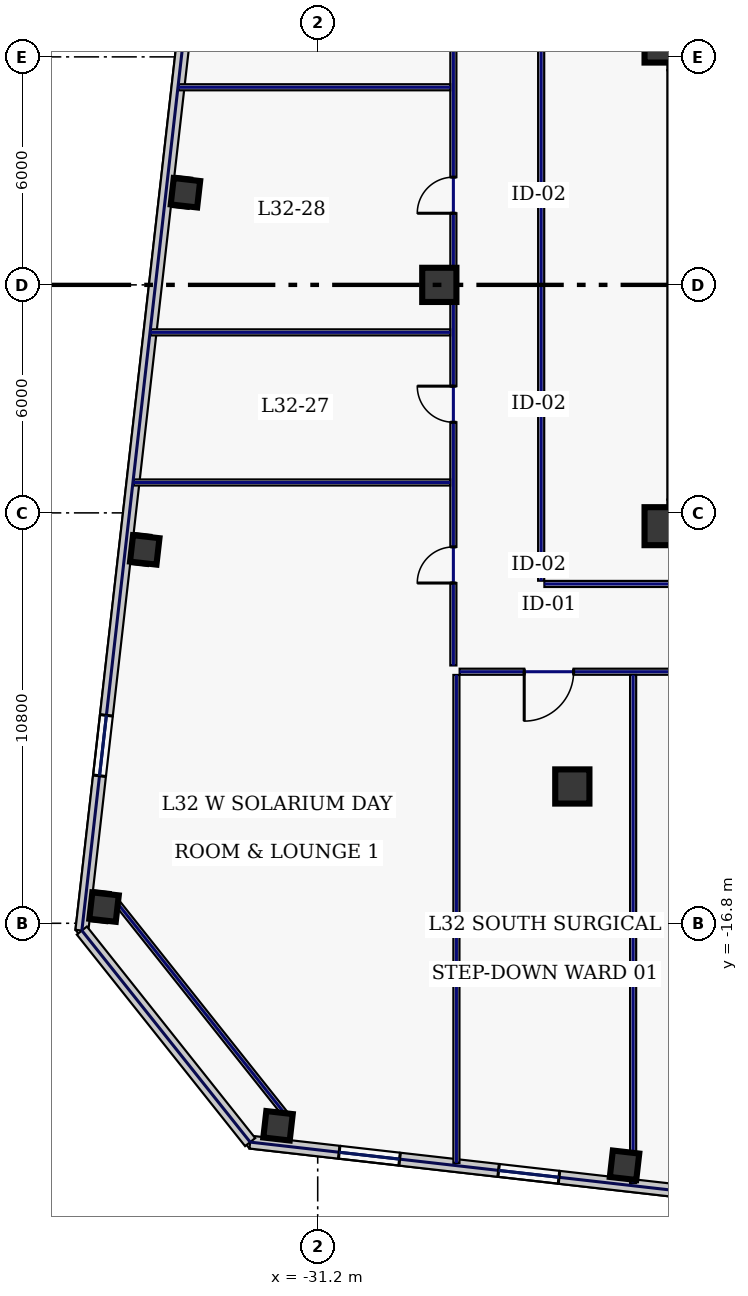
"""IFC4 building model, lengths in metres.
Left out: names, types, materials, properties, quantities, classifications, styles, units other than length and angle.
Written with IfcOpenShell. Run it as: python <this file> out.ifc"""

import sys

from ifc_helpers import new_model, si_unit, direction, frame, frame_2d, origin, origin_2d, place, context, subcontext, project, spatial, rectangle, hollow_rectangle, extrude, element, fill, save


model = new_model("IFC4")
c1 = context("Model", 3, precision=1e-05, world=origin(), true_north=direction((0.0, 1.0)))
c2 = subcontext(c1, "Body", "Model", "MODEL_VIEW")
j1 = project(units=[si_unit("LENGTHUNIT", "METRE"), si_unit("PLANEANGLEUNIT", "RADIAN")], contexts=[c1])
p1 = place(None, origin())
s1 = spatial("IfcSite", under=j1, at=p1, CompositionType="ELEMENT")
p2 = place(p1, origin())
s2 = spatial("IfcBuilding", under=s1, at=p2, CompositionType="ELEMENT")
p3 = place(p2, frame((0.0, 0.0, 141.4)))
s3 = spatial("IfcBuildingStorey", under=s2, at=p3, CompositionType="ELEMENT", Elevation=141.4)
for number, where, z_axis, x_axis in (
    (1, (-22.0, 6.0, 0.0), (0.0, 0.0, 1.0), (1.0, 0.0, 0.0)),
    (2, (-22.0, -6.0, 0.0), (0.0, 0.0, 1.0), (1.0, 0.0, 0.0)),
):
    element("IfcWall", number, at=place(p3, frame(where, z_axis=z_axis, x_axis=x_axis)), inside=s3, PredefinedType="SHEAR", context=c2, shape_type="SweptSolid", body=[
        extrude(rectangle(XDim=11.55, YDim=0.7, at=frame_2d((5.775, 0.0))), origin(), (0.0, 0.0, 1.0), 4.48),
    ])
p4 = place(p3, frame((-21.6, -5.65, 0.0), z_axis=(0.0, 0.0, 1.0), x_axis=(0.0, 1.0, 0.0)))
e3 = element("IfcWall", 3, at=p4, inside=s3, PredefinedType="SHEAR", context=c2, shape_type="SweptSolid", body=[
    extrude(rectangle(XDim=11.3, YDim=0.8, at=frame_2d((5.65, 0.0))), origin(), (0.0, 0.0, 1.0), 4.48),
])
for number, where, z_axis, x_axis in (
    (4, (-22.1, -6.35, 0.0), (0.0, 0.0, 1.0), (1.0, 0.0, 0.0)),
    (5, (-22.1, 6.35, 0.0), (0.0, 0.0, 1.0), (1.0, 0.0, 0.0)),
):
    element("IfcColumn", number, at=place(p3, frame(where, z_axis=z_axis, x_axis=x_axis)), inside=s3, PredefinedType="COLUMN", context=c2, shape_type="SweptSolid", body=[
        extrude(hollow_rectangle(XDim=1.0, YDim=1.0, WallThickness=0.045, at=origin_2d()), origin(), (0.0, 0.0, 1.0), 4.48),
    ])
for number, where, z_axis, x_axis in (
    (6, (-24.5, -13.2, 0.0), (0.0, 0.0, 1.0), (1.0, 0.0, 0.0)),
    (7, (-28.0, 0.0, 0.0), (0.0, 0.0, 1.0), (1.0, 0.0, 0.0)),
):
    element("IfcColumn", number, at=place(p3, frame(where, z_axis=z_axis, x_axis=x_axis)), inside=s3, PredefinedType="COLUMN", context=c2, shape_type="SweptSolid", body=[
        extrude(hollow_rectangle(XDim=0.9, YDim=0.9, WallThickness=0.04, at=origin_2d()), origin(), (0.0, 0.0, 1.0), 4.48),
    ])
for number, where, z_axis, x_axis in (
    (8, (-32.244, -22.129, 0.0), (0.0, 0.0, 1.0), (0.994, -0.113, 0.0)),
    (9, (-23.126, -23.168, 0.0), (0.0, 0.0, 1.0), (0.994, -0.113, 0.0)),
    (10, (-34.68, 2.425, 0.0), (0.0, 0.0, 1.0), (0.994, -0.113, 0.0)),
    (11, (-35.751, -6.974, 0.0), (0.0, 0.0, 1.0), (0.994, -0.113, 0.0)),
    (12, (-36.822, -16.374, 0.0), (0.0, 0.0, 1.0), (0.994, -0.113, 0.0)),
):
    element("IfcColumn", number, at=place(p3, frame(where, z_axis=z_axis, x_axis=x_axis)), inside=s3, PredefinedType="COLUMN", context=c2, shape_type="SweptSolid", body=[
        extrude(hollow_rectangle(XDim=0.7, YDim=0.7, WallThickness=0.032, at=origin_2d()), origin(), (0.0, 0.0, 1.0), 4.48),
    ])
p5 = place(p3, frame((-32.977, -22.559, 0.0), z_axis=(0.0, 0.0, 1.0), x_axis=(0.993571877006, -0.113203026563, 0.0)))
e13 = element("IfcWall", 13, at=p5, inside=s3, PredefinedType="STANDARD", context=c2, shape_type="SweptSolid", body=[
    extrude(rectangle(XDim=20.523, YDim=0.34, at=frame_2d((10.261, 0.0))), origin(), (0.0, 0.0, 1.0), 4.48),
])
p6 = place(p5, frame((2.358, 0.0, 0.22)))
e14 = element("IfcOpeningElement", 14, at=p6, cuts=e13, PredefinedType="OPENING", context=c2, shape_type="SweptSolid", body=[
    extrude(rectangle(XDim=1.6, YDim=1.2, at=frame_2d((0.8, 0.6))), frame((0.0, 0.18, 0.0), z_axis=(0.0, -1.0, 0.0), x_axis=(1.0, 0.0, 0.0)), (0.0, 0.0, 1.0), 0.36),
])
p7 = place(p5, frame((6.579, 0.0, 0.22)))
e15 = element("IfcOpeningElement", 15, at=p7, cuts=e13, PredefinedType="OPENING", context=c2, shape_type="SweptSolid", body=[
    extrude(rectangle(XDim=1.6, YDim=1.2, at=frame_2d((0.8, 0.6))), frame((0.0, 0.18, 0.0), z_axis=(0.0, -1.0, 0.0), x_axis=(1.0, 0.0, 0.0)), (0.0, 0.0, 1.0), 0.36),
])
p8 = place(p5, frame((11.535, 0.0, 0.22)))
e16 = element("IfcOpeningElement", 16, at=p8, cuts=e13, PredefinedType="OPENING", context=c2, shape_type="SweptSolid", body=[
    extrude(rectangle(XDim=1.6, YDim=1.2, at=frame_2d((0.8, 0.6))), frame((0.0, 0.18, 0.0), z_axis=(0.0, -1.0, 0.0), x_axis=(1.0, 0.0, 0.0)), (0.0, 0.0, 1.0), 0.36),
])
p9 = place(p5, frame((15.756, 0.0, 0.22)))
e17 = element("IfcOpeningElement", 17, at=p9, cuts=e13, PredefinedType="OPENING", context=c2, shape_type="SweptSolid", body=[
    extrude(rectangle(XDim=1.6, YDim=1.2, at=frame_2d((0.8, 0.6))), frame((0.0, 0.18, 0.0), z_axis=(0.0, -1.0, 0.0), x_axis=(1.0, 0.0, 0.0)), (0.0, 0.0, 1.0), 0.36),
])
p10 = place(p3, frame((-32.968, 21.957, 0.0), z_axis=(0.0, 0.0, 1.0), x_axis=(-0.113201605824, -0.993572038877, 0.0)))
e18 = element("IfcWall", 18, at=p10, inside=s3, PredefinedType="STANDARD", context=c2, shape_type="SweptSolid", body=[
    extrude(rectangle(XDim=39.2, YDim=0.34, at=frame_2d((19.6, 0.0))), origin(), (0.0, 0.0, 1.0), 4.48),
])
p11 = place(p10, frame((4.1, 0.0, 0.22)))
e19 = element("IfcOpeningElement", 19, at=p11, cuts=e18, PredefinedType="OPENING", context=c2, shape_type="SweptSolid", body=[
    extrude(rectangle(XDim=1.6, YDim=1.2, at=frame_2d((0.8, 0.6))), frame((0.0, 0.18, 0.0), z_axis=(0.0, -1.0, 0.0), x_axis=(1.0, 0.0, 0.0)), (0.0, 0.0, 1.0), 0.36),
])
p12 = place(p10, frame((13.9, 0.0, 0.22)))
e20 = element("IfcOpeningElement", 20, at=p12, cuts=e18, PredefinedType="OPENING", context=c2, shape_type="SweptSolid", body=[
    extrude(rectangle(XDim=1.6, YDim=1.2, at=frame_2d((0.8, 0.6))), frame((0.0, 0.18, 0.0), z_axis=(0.0, -1.0, 0.0), x_axis=(1.0, 0.0, 0.0)), (0.0, 0.0, 1.0), 0.36),
])
p13 = place(p10, frame((33.5, 0.0, 0.22)))
e21 = element("IfcOpeningElement", 21, at=p13, cuts=e18, PredefinedType="OPENING", context=c2, shape_type="SweptSolid", body=[
    extrude(rectangle(XDim=1.6, YDim=1.2, at=frame_2d((0.8, 0.6))), frame((0.0, 0.18, 0.0), z_axis=(0.0, -1.0, 0.0), x_axis=(1.0, 0.0, 0.0)), (0.0, 0.0, 1.0), 0.36),
])
p14 = place(p3, frame((-37.406, -16.991, 0.0), z_axis=(0.0, 0.0, 1.0), x_axis=(0.622507800567, -0.78261359446, 0.0)))
e22 = element("IfcWall", 22, at=p14, inside=s3, PredefinedType="STANDARD", context=c2, shape_type="SweptSolid", body=[
    extrude(rectangle(XDim=7.114, YDim=0.34, at=frame_2d((3.557, 0.0))), origin(), (0.0, 0.0, 1.0), 4.48),
])
p15 = place(p3, frame((-36.556, -16.162, 0.0), z_axis=(0.0, 0.0, 1.0), x_axis=(0.622522641622, -0.782601789334, 0.0)))
e23 = element("IfcWall", 23, at=p15, inside=s3, PredefinedType="PARTITIONING", context=c2, shape_type="SweptSolid", body=[
    extrude(rectangle(XDim=7.354, YDim=0.16, at=frame_2d((3.677, 0.0))), origin(), (0.0, 0.0, 1.0), 2.275),
])
p16 = place(p3, frame((-27.63, -10.015, 0.0), z_axis=(0.0, 0.0, 1.0), x_axis=(0.0, 1.0, 0.0)))
e24 = element("IfcWall", 24, at=p16, inside=s3, PredefinedType="PARTITIONING", context=c2, shape_type="SweptSolid", body=[
    extrude(rectangle(XDim=20.13, YDim=0.16, at=frame_2d((10.065, 0.0))), origin(), (0.0, 0.0, 1.0), 4.48),
])
p17 = place(p16, frame((2.169, 0.0, 0.0)))
e25 = element("IfcOpeningElement", 25, at=p17, cuts=e24, PredefinedType="OPENING", context=c2, shape_type="SweptSolid", body=[
    extrude(rectangle(XDim=0.95, YDim=2.2, at=frame_2d((0.475, 1.1))), frame((0.0, 0.09, 0.0), z_axis=(0.0, -1.0, 0.0), x_axis=(1.0, 0.0, 0.0)), (0.0, 0.0, 1.0), 0.18),
])
p18 = place(p16, frame((6.4, 0.0, 0.0)))
e26 = element("IfcOpeningElement", 26, at=p18, cuts=e24, PredefinedType="OPENING", context=c2, shape_type="SweptSolid", body=[
    extrude(rectangle(XDim=0.95, YDim=2.2, at=frame_2d((0.475, 1.1))), frame((0.0, 0.09, 0.0), z_axis=(0.0, -1.0, 0.0), x_axis=(1.0, 0.0, 0.0)), (0.0, 0.0, 1.0), 0.18),
])
p19 = place(p16, frame((11.9, 0.0, 0.0)))
e27 = element("IfcOpeningElement", 27, at=p19, cuts=e24, PredefinedType="OPENING", context=c2, shape_type="SweptSolid", body=[
    extrude(rectangle(XDim=0.95, YDim=2.2, at=frame_2d((0.475, 1.1))), frame((0.0, 0.09, 0.0), z_axis=(0.0, -1.0, 0.0), x_axis=(1.0, 0.0, 0.0)), (0.0, 0.0, 1.0), 0.18),
])
p20 = place(p16, frame((17.131, 0.0, 0.0)))
e28 = element("IfcOpeningElement", 28, at=p20, cuts=e24, PredefinedType="OPENING", context=c2, shape_type="SweptSolid", body=[
    extrude(rectangle(XDim=0.95, YDim=2.2, at=frame_2d((0.475, 1.1))), frame((0.0, 0.09, 0.0), z_axis=(0.0, -1.0, 0.0), x_axis=(1.0, 0.0, 0.0)), (0.0, 0.0, 1.0), 0.18),
])
p21 = place(p3, frame((27.465, -10.18, 0.0), z_axis=(0.0, 0.0, 1.0), x_axis=(-1.0, 0.0, 0.0)))
e29 = element("IfcWall", 29, at=p21, inside=s3, PredefinedType="PARTITIONING", context=c2, shape_type="SweptSolid", body=[
    extrude(rectangle(XDim=54.93, YDim=0.16, at=frame_2d((27.465, 0.0))), origin(), (0.0, 0.0, 1.0), 4.48),
])
p22 = place(p21, frame((51.931, 0.0, 0.0)))
e30 = element("IfcOpeningElement", 30, at=p22, cuts=e29, PredefinedType="OPENING", context=c2, shape_type="SweptSolid", body=[
    extrude(rectangle(XDim=1.3, YDim=2.2, at=frame_2d((0.65, 1.1))), frame((0.0, 0.09, 0.0), z_axis=(0.0, -1.0, 0.0), x_axis=(1.0, 0.0, 0.0)), (0.0, 0.0, 1.0), 0.18),
])
p23 = place(p21, frame((45.225, 0.0, 0.0)))
e31 = element("IfcOpeningElement", 31, at=p23, cuts=e29, PredefinedType="OPENING", context=c2, shape_type="SweptSolid", body=[
    extrude(rectangle(XDim=0.95, YDim=2.2, at=frame_2d((0.475, 1.1))), frame((0.0, 0.09, 0.0), z_axis=(0.0, -1.0, 0.0), x_axis=(1.0, 0.0, 0.0)), (0.0, 0.0, 1.0), 0.18),
])
p24 = place(p21, frame((36.525, 0.0, 0.0)))
e32 = element("IfcOpeningElement", 32, at=p24, cuts=e29, PredefinedType="OPENING", context=c2, shape_type="SweptSolid", body=[
    extrude(rectangle(XDim=0.95, YDim=2.2, at=frame_2d((0.475, 1.1))), frame((0.0, 0.09, 0.0), z_axis=(0.0, -1.0, 0.0), x_axis=(1.0, 0.0, 0.0)), (0.0, 0.0, 1.0), 0.18),
])
p25 = place(p21, frame((28.125, 0.0, 0.0)))
e33 = element("IfcOpeningElement", 33, at=p25, cuts=e29, PredefinedType="OPENING", context=c2, shape_type="SweptSolid", body=[
    extrude(rectangle(XDim=0.95, YDim=2.2, at=frame_2d((0.475, 1.1))), frame((0.0, 0.09, 0.0), z_axis=(0.0, -1.0, 0.0), x_axis=(1.0, 0.0, 0.0)), (0.0, 0.0, 1.0), 0.18),
])
p26 = place(p21, frame((19.325, 0.0, 0.0)))
e34 = element("IfcOpeningElement", 34, at=p26, cuts=e29, PredefinedType="OPENING", context=c2, shape_type="SweptSolid", body=[
    extrude(rectangle(XDim=0.95, YDim=2.2, at=frame_2d((0.475, 1.1))), frame((0.0, 0.09, 0.0), z_axis=(0.0, -1.0, 0.0), x_axis=(1.0, 0.0, 0.0)), (0.0, 0.0, 1.0), 0.18),
])
p27 = place(p21, frame((10.75, 0.0, 0.0)))
e35 = element("IfcOpeningElement", 35, at=p27, cuts=e29, PredefinedType="OPENING", context=c2, shape_type="SweptSolid", body=[
    extrude(rectangle(XDim=1.3, YDim=2.2, at=frame_2d((0.65, 1.1))), frame((0.0, 0.09, 0.0), z_axis=(0.0, -1.0, 0.0), x_axis=(1.0, 0.0, 0.0)), (0.0, 0.0, 1.0), 0.18),
])
p28 = place(p21, frame((3.394, 0.0, 0.0)))
e36 = element("IfcOpeningElement", 36, at=p28, cuts=e29, PredefinedType="OPENING", context=c2, shape_type="SweptSolid", body=[
    extrude(rectangle(XDim=1.15, YDim=2.2, at=frame_2d((0.575, 1.1))), frame((0.0, 0.09, 0.0), z_axis=(0.0, -1.0, 0.0), x_axis=(1.0, 0.0, 0.0)), (0.0, 0.0, 1.0), 0.18),
])
p29 = place(p3, frame((-25.32, 7.885, 0.0), z_axis=(0.0, 0.0, 1.0), x_axis=(0.0, -1.0, 0.0)))
e37 = element("IfcWall", 37, at=p29, inside=s3, PredefinedType="PARTITIONING", context=c2, shape_type="SweptSolid", body=[
    extrude(rectangle(XDim=15.67, YDim=0.16, at=frame_2d((7.835, 0.0))), origin(), (0.0, 0.0, 1.0), 4.48),
])
p30 = place(p3, frame((-25.235, -7.87, 0.0), z_axis=(0.0, 0.0, 1.0), x_axis=(1.0, 0.0, 0.0)))
e38 = element("IfcWall", 38, at=p30, inside=s3, PredefinedType="PARTITIONING", context=c2, shape_type="SweptSolid", body=[
    extrude(rectangle(XDim=14.57, YDim=0.16, at=frame_2d((7.285, 0.0))), origin(), (0.0, 0.0, 1.0), 4.48),
])
p31 = place(p3, frame((-27.55, -23.106, 0.0), z_axis=(0.0, 0.0, 1.0), x_axis=(0.0, 1.0, 0.0)))
e39 = element("IfcWall", 39, at=p31, inside=s3, PredefinedType="PARTITIONING", context=c2, shape_type="SweptSolid", body=[
    extrude(rectangle(XDim=12.842, YDim=0.16, at=frame_2d((6.421, 0.0))), origin(), (0.0, 0.0, 1.0), 4.48),
])
p32 = place(p3, frame((-22.9, -23.636, 0.0), z_axis=(0.0, 0.0, 1.0), x_axis=(0.0, 1.0, 0.0)))
e40 = element("IfcWall", 40, at=p32, inside=s3, PredefinedType="PARTITIONING", context=c2, shape_type="SweptSolid", body=[
    extrude(rectangle(XDim=13.371, YDim=0.16, at=frame_2d((6.686, 0.0))), origin(), (0.0, 0.0, 1.0), 4.48),
])
p33 = place(p3, frame((-36.042, -5.2, 0.0), z_axis=(0.0, 0.0, 1.0), x_axis=(1.0, 0.0, 0.0)))
e41 = element("IfcWall", 41, at=p33, inside=s3, PredefinedType="PARTITIONING", context=c2, shape_type="SweptSolid", body=[
    extrude(rectangle(XDim=8.327, YDim=0.16, at=frame_2d((4.164, 0.0))), origin(), (0.0, 0.0, 1.0), 4.48),
])
p34 = place(p3, frame((-35.592, -1.25, 0.0), z_axis=(0.0, 0.0, 1.0), x_axis=(1.0, 0.0, 0.0)))
e42 = element("IfcWall", 42, at=p34, inside=s3, PredefinedType="PARTITIONING", context=c2, shape_type="SweptSolid", body=[
    extrude(rectangle(XDim=7.877, YDim=0.16, at=frame_2d((3.938, 0.0))), origin(), (0.0, 0.0, 1.0), 4.48),
])
p35 = place(p3, frame((-34.857, 5.2, 0.0), z_axis=(0.0, 0.0, 1.0), x_axis=(1.0, 0.0, 0.0)))
e43 = element("IfcWall", 43, at=p35, inside=s3, PredefinedType="PARTITIONING", context=c2, shape_type="SweptSolid", body=[
    extrude(rectangle(XDim=7.142, YDim=0.16, at=frame_2d((3.571, 0.0))), origin(), (0.0, 0.0, 1.0), 4.48),
])
p36 = place(p6, origin())
e44 = element("IfcWindow", 44, at=p36, inside=s3, PartitioningType="SINGLE_PANEL", PredefinedType="WINDOW", context=c2, shape_type="SweptSolid", body=[
    extrude(rectangle(XDim=1.6, YDim=1.2, at=frame_2d((0.8, 0.6))), frame((0.0, 0.03, 0.0), z_axis=(0.0, -1.0, 0.0), x_axis=(1.0, 0.0, 0.0)), (0.0, 0.0, 1.0), 0.06),
])
fill(e14, e44)
p37 = place(p7, origin())
e45 = element("IfcWindow", 45, at=p37, inside=s3, PartitioningType="SINGLE_PANEL", PredefinedType="WINDOW", context=c2, shape_type="SweptSolid", body=[
    extrude(rectangle(XDim=1.6, YDim=1.2, at=frame_2d((0.8, 0.6))), frame((0.0, 0.03, 0.0), z_axis=(0.0, -1.0, 0.0), x_axis=(1.0, 0.0, 0.0)), (0.0, 0.0, 1.0), 0.06),
])
fill(e15, e45)
p38 = place(p13, origin())
e46 = element("IfcWindow", 46, at=p38, inside=s3, PartitioningType="SINGLE_PANEL", PredefinedType="WINDOW", context=c2, shape_type="SweptSolid", body=[
    extrude(rectangle(XDim=1.6, YDim=1.2, at=frame_2d((0.8, 0.6))), frame((0.0, 0.03, 0.0), z_axis=(0.0, -1.0, 0.0), x_axis=(1.0, 0.0, 0.0)), (0.0, 0.0, 1.0), 0.06),
])
fill(e21, e46)
p39 = place(p22, origin())
e47 = element("IfcDoor", 47, at=p39, inside=s3, OperationType="SINGLE_SWING_RIGHT", PredefinedType="DOOR", context=c2, shape_type="SweptSolid", body=[
    extrude(rectangle(XDim=1.3, YDim=2.2, at=frame_2d((0.65, 1.1))), frame((0.0, 0.025, 0.0), z_axis=(0.0, -1.0, 0.0), x_axis=(1.0, 0.0, 0.0)), (0.0, 0.0, 1.0), 0.05),
])
fill(e30, e47)
p40 = place(p17, origin())
e48 = element("IfcDoor", 48, at=p40, inside=s3, OperationType="SINGLE_SWING_LEFT", PredefinedType="DOOR", context=c2, shape_type="SweptSolid", body=[
    extrude(rectangle(XDim=0.95, YDim=2.2, at=frame_2d((0.475, 1.1))), frame((0.0, 0.025, 0.0), z_axis=(0.0, -1.0, 0.0), x_axis=(1.0, 0.0, 0.0)), (0.0, 0.0, 1.0), 0.05),
])
fill(e25, e48)
p41 = place(p18, origin())
e49 = element("IfcDoor", 49, at=p41, inside=s3, OperationType="SINGLE_SWING_RIGHT", PredefinedType="DOOR", context=c2, shape_type="SweptSolid", body=[
    extrude(rectangle(XDim=0.95, YDim=2.2, at=frame_2d((0.475, 1.1))), frame((0.0, 0.025, 0.0), z_axis=(0.0, -1.0, 0.0), x_axis=(1.0, 0.0, 0.0)), (0.0, 0.0, 1.0), 0.05),
])
fill(e26, e49)
p42 = place(p19, origin())
e50 = element("IfcDoor", 50, at=p42, inside=s3, OperationType="SINGLE_SWING_LEFT", PredefinedType="DOOR", context=c2, shape_type="SweptSolid", body=[
    extrude(rectangle(XDim=0.95, YDim=2.2, at=frame_2d((0.475, 1.1))), frame((0.0, 0.025, 0.0), z_axis=(0.0, -1.0, 0.0), x_axis=(1.0, 0.0, 0.0)), (0.0, 0.0, 1.0), 0.05),
])
fill(e27, e50)
save(model, sys.argv[1])
